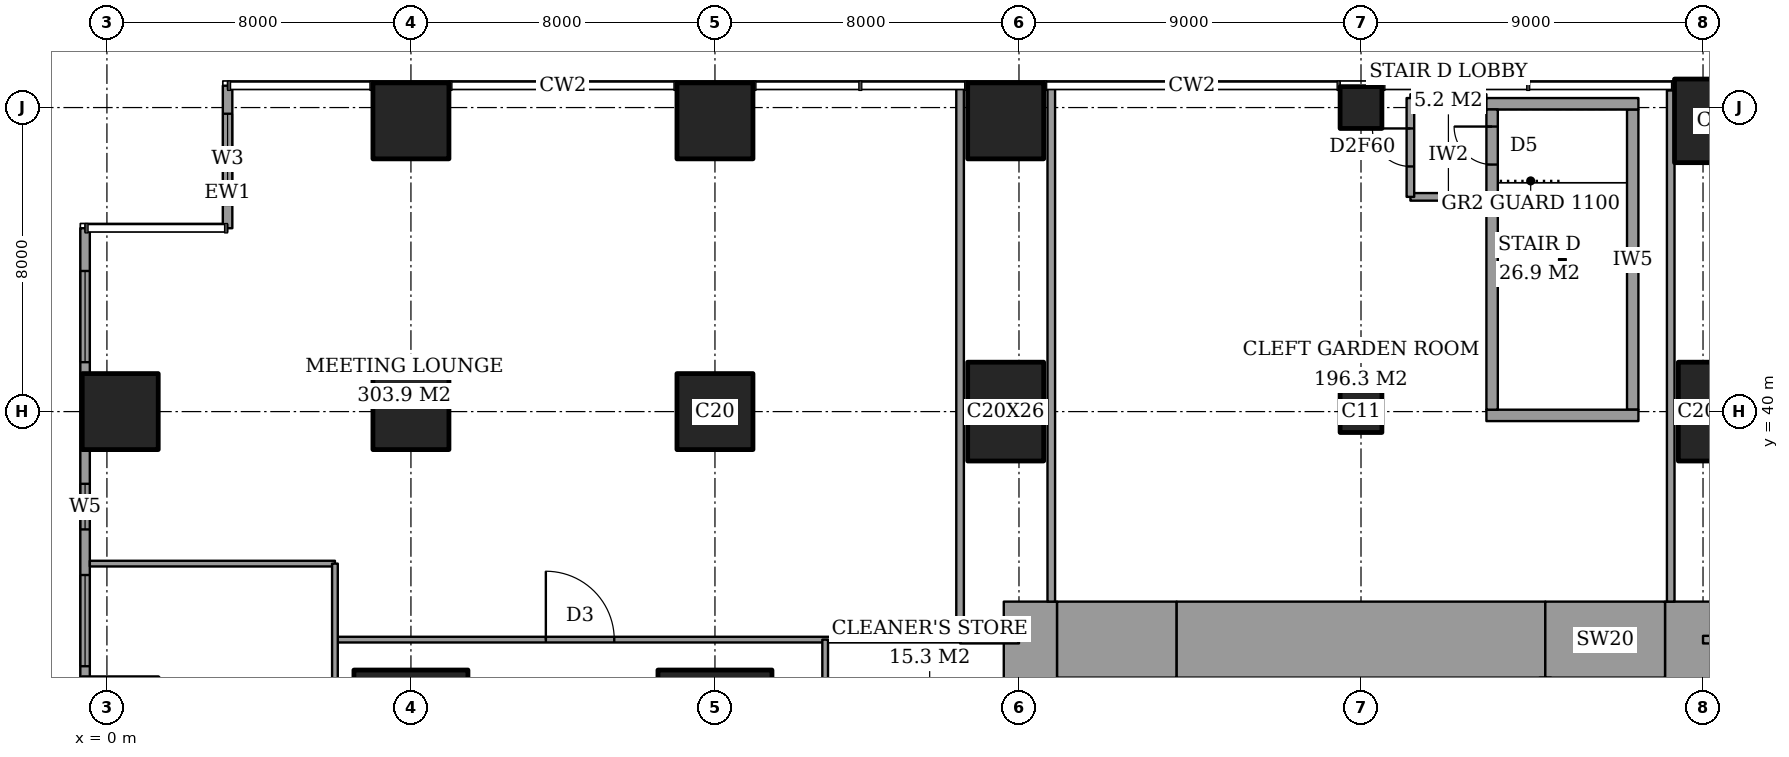
"""IFC4 building model, lengths in metres.
Left out: names, types, materials, properties, quantities, classifications, styles, units other than length and angle.
Written with IfcOpenShell. Run it as: python <this file> out.ifc"""

import sys

from ifc_helpers import new_model, si_unit, direction, frame, frame_2d, origin, origin_2d, place, context, subcontext, project, spatial, rectangle, extrude, element, fill, save


model = new_model("IFC4")
c1 = context("Model", 3, precision=1e-05, world=origin(), true_north=direction((0.0, 1.0)))
c2 = subcontext(c1, "Body", "Model", "MODEL_VIEW")
j1 = project(units=[si_unit("LENGTHUNIT", "METRE"), si_unit("PLANEANGLEUNIT", "RADIAN")], contexts=[c1])
p1 = place(None, origin())
s1 = spatial("IfcSite", under=j1, at=p1, CompositionType="ELEMENT")
p2 = place(p1, origin())
s2 = spatial("IfcBuilding", under=s1, at=p2, CompositionType="ELEMENT")
p3 = place(p2, frame((0.0, 0.0, 21.0)))
s3 = spatial("IfcBuildingStorey", under=s2, at=p3, CompositionType="ELEMENT", Elevation=21.0)
p4 = place(p3, frame((0.35, 40.0, 0.0), z_axis=(0.0, 0.0, 1.0), x_axis=(1.0, 0.0, 0.0)))
e1 = element("IfcColumn", 1, at=p4, inside=s3, PredefinedType="COLUMN", context=c2, shape_type="SweptSolid", body=[
    extrude(rectangle(XDim=2.0, YDim=2.0, at=origin_2d()), origin(), (0.0, 0.0, 1.0), 5.0),
])
p5 = place(p3, frame((8.0, 32.0, 0.0), z_axis=(0.0, 0.0, 1.0), x_axis=(1.0, 0.0, 0.0)))
e2 = element("IfcColumn", 2, at=p5, inside=s3, PredefinedType="COLUMN", context=c2, shape_type="SweptSolid", body=[
    extrude(rectangle(XDim=3.0, YDim=2.4, at=origin_2d()), origin(), (0.0, 0.0, 1.0), 5.0),
])
for number, where, z_axis, x_axis in (
    (3, (8.0, 40.0, 0.0), (0.0, 0.0, 1.0), (1.0, 0.0, 0.0)),
    (4, (8.0, 47.65, 0.0), (0.0, 0.0, 1.0), (1.0, 0.0, 0.0)),
):
    element("IfcColumn", number, at=place(p3, frame(where, z_axis=z_axis, x_axis=x_axis)), inside=s3, PredefinedType="COLUMN", context=c2, shape_type="SweptSolid", body=[
        extrude(rectangle(XDim=2.0, YDim=2.0, at=origin_2d()), origin(), (0.0, 0.0, 1.0), 5.0),
    ])
p6 = place(p3, frame((16.0, 32.0, 0.0), z_axis=(0.0, 0.0, 1.0), x_axis=(1.0, 0.0, 0.0)))
e5 = element("IfcColumn", 5, at=p6, inside=s3, PredefinedType="COLUMN", context=c2, shape_type="SweptSolid", body=[
    extrude(rectangle(XDim=3.0, YDim=2.4, at=origin_2d()), origin(), (0.0, 0.0, 1.0), 5.0),
])
for number, where, z_axis, x_axis in (
    (6, (16.0, 40.0, 0.0), (0.0, 0.0, 1.0), (1.0, 0.0, 0.0)),
    (7, (16.0, 47.65, 0.0), (0.0, 0.0, 1.0), (1.0, 0.0, 0.0)),
):
    element("IfcColumn", number, at=place(p3, frame(where, z_axis=z_axis, x_axis=x_axis)), inside=s3, PredefinedType="COLUMN", context=c2, shape_type="SweptSolid", body=[
        extrude(rectangle(XDim=2.0, YDim=2.0, at=origin_2d()), origin(), (0.0, 0.0, 1.0), 5.0),
    ])
p7 = place(p3, frame((23.65, 40.0, 0.0), z_axis=(0.0, 0.0, 1.0), x_axis=(1.0, 0.0, 0.0)))
e8 = element("IfcColumn", 8, at=p7, inside=s3, PredefinedType="COLUMN", context=c2, shape_type="SweptSolid", body=[
    extrude(rectangle(XDim=2.0, YDim=2.6, at=origin_2d()), origin(), (0.0, 0.0, 1.0), 5.0),
])
p8 = place(p3, frame((23.65, 47.65, 0.0), z_axis=(0.0, 0.0, 1.0), x_axis=(1.0, 0.0, 0.0)))
e9 = element("IfcColumn", 9, at=p8, inside=s3, PredefinedType="COLUMN", context=c2, shape_type="SweptSolid", body=[
    extrude(rectangle(XDim=2.0, YDim=2.0, at=origin_2d()), origin(), (0.0, 0.0, 1.0), 5.0),
])
for number, where, z_axis, x_axis in (
    (10, (33.0, 40.0, 0.0), (0.0, 0.0, 1.0), (1.0, 0.0, 0.0)),
    (11, (33.0, 48.0, 0.0), (0.0, 0.0, 1.0), (1.0, 0.0, 0.0)),
):
    element("IfcColumn", number, at=place(p3, frame(where, z_axis=z_axis, x_axis=x_axis)), inside=s3, PredefinedType="COLUMN", context=c2, shape_type="SweptSolid", body=[
        extrude(rectangle(XDim=1.1, YDim=1.1, at=origin_2d()), origin(), (0.0, 0.0, 1.0), 5.0),
    ])
p9 = place(p3, frame((42.35, 40.0, 0.0), z_axis=(0.0, 0.0, 1.0), x_axis=(1.0, 0.0, 0.0)))
e12 = element("IfcColumn", 12, at=p9, inside=s3, PredefinedType="COLUMN", context=c2, shape_type="SweptSolid", body=[
    extrude(rectangle(XDim=2.0, YDim=2.6, at=origin_2d()), origin(), (0.0, 0.0, 1.0), 5.0),
])
p10 = place(p3, frame((42.35, 47.65, 0.0), z_axis=(0.0, 0.0, 1.0), x_axis=(1.0, 0.0, 0.0)))
e13 = element("IfcColumn", 13, at=p10, inside=s3, PredefinedType="COLUMN", context=c2, shape_type="SweptSolid", body=[
    extrude(rectangle(XDim=2.2, YDim=2.2, at=origin_2d()), origin(), (0.0, 0.0, 1.0), 5.0),
])
p11 = place(p3, frame((25.0, 34.0, 0.0), z_axis=(0.0, 0.0, 1.0), x_axis=(1.0, 0.0, 0.0)))
e14 = element("IfcWall", 14, at=p11, inside=s3, PredefinedType="SHEAR", context=c2, shape_type="SweptSolid", body=[
    extrude(rectangle(XDim=3.15, YDim=2.0, at=frame_2d((1.575, 0.0))), origin(), (0.0, 0.0, 1.0), 5.0),
])
p12 = place(p3, frame((28.15, 34.0, 0.0), z_axis=(0.0, 0.0, 1.0), x_axis=(1.0, 0.0, 0.0)))
e15 = element("IfcWall", 15, at=p12, inside=s3, PredefinedType="SHEAR", context=c2, shape_type="SweptSolid", body=[
    extrude(rectangle(XDim=9.7, YDim=2.0, at=frame_2d((4.85, 0.0))), origin(), (0.0, 0.0, 1.0), 5.0),
])
p13 = place(p3, frame((37.85, 34.0, 0.0), z_axis=(0.0, 0.0, 1.0), x_axis=(1.0, 0.0, 0.0)))
e16 = element("IfcWall", 16, at=p13, inside=s3, PredefinedType="SHEAR", context=c2, shape_type="SweptSolid", body=[
    extrude(rectangle(XDim=3.15, YDim=2.0, at=frame_2d((1.575, 0.0))), origin(), (0.0, 0.0, 1.0), 5.0),
])
p14 = place(p3, frame((24.3, 23.15, 0.0), z_axis=(0.0, 0.0, 1.0), x_axis=(0.0, 1.0, 0.0)))
e17 = element("IfcWall", 17, at=p14, inside=s3, PredefinedType="SHEAR", context=c2, shape_type="SweptSolid", body=[
    extrude(rectangle(XDim=11.85, YDim=1.4, at=frame_2d((5.925, 0.0))), origin(), (0.0, 0.0, 1.0), 5.0),
])
p15 = place(p14, frame((0.75, 0.0, 0.0)))
e18 = element("IfcOpeningElement", 18, at=p15, cuts=e17, PredefinedType="OPENING", context=c2, shape_type="SweptSolid", body=[
    extrude(rectangle(XDim=1.8, YDim=2.4, at=frame_2d((0.9, 1.2))), frame((0.0, 0.71, 0.0), z_axis=(0.0, -1.0, 0.0), x_axis=(1.0, 0.0, 0.0)), (0.0, 0.0, 1.0), 1.42),
])
p16 = place(p3, frame((41.7, 24.85, 0.0), z_axis=(0.0, 0.0, 1.0), x_axis=(0.0, 1.0, 0.0)))
e19 = element("IfcWall", 19, at=p16, inside=s3, PredefinedType="SHEAR", context=c2, shape_type="SweptSolid", body=[
    extrude(rectangle(XDim=10.15, YDim=1.4, at=frame_2d((5.075, 0.0))), origin(), (0.0, 0.0, 1.0), 5.0),
])
p17 = place(p3, frame((3.175, 48.575, 0.0), z_axis=(0.0, 0.0, 1.0), x_axis=(0.0, -1.0, 0.0)))
e20 = element("IfcWall", 20, at=p17, inside=s3, PredefinedType="SOLIDWALL", context=c2, shape_type="SweptSolid", body=[
    extrude(rectangle(XDim=3.75, YDim=0.25, at=frame_2d((1.875, 0.0))), origin(), (0.0, 0.0, 1.0), 5.0),
])
p18 = place(p17, frame((0.738, 0.0, 0.6)))
e21 = element("IfcOpeningElement", 21, at=p18, cuts=e20, PredefinedType="OPENING", context=c2, shape_type="SweptSolid", body=[
    extrude(rectangle(XDim=2.4, YDim=3.0, at=frame_2d((1.2, 1.5))), frame((0.0, 0.135, 0.0), z_axis=(0.0, -1.0, 0.0), x_axis=(1.0, 0.0, 0.0)), (0.0, 0.0, 1.0), 0.27),
])
p19 = place(p3, frame((-0.575, 44.825, 0.0), z_axis=(0.0, 0.0, 1.0), x_axis=(0.0, -1.0, 0.0)))
e22 = element("IfcWall", 22, at=p19, inside=s3, PredefinedType="SOLIDWALL", context=c2, shape_type="SweptSolid", body=[
    extrude(rectangle(XDim=41.65, YDim=0.25, at=frame_2d((20.825, 0.0))), origin(), (0.0, 0.0, 1.0), 5.0),
])
p20 = place(p19, frame((6.725, 0.0, 0.6)))
e23 = element("IfcOpeningElement", 23, at=p20, cuts=e22, PredefinedType="OPENING", context=c2, shape_type="SweptSolid", body=[
    extrude(rectangle(XDim=1.2, YDim=3.0, at=frame_2d((0.6, 1.5))), frame((0.0, 0.135, 0.0), z_axis=(0.0, -1.0, 0.0), x_axis=(1.0, 0.0, 0.0)), (0.0, 0.0, 1.0), 0.27),
])
p21 = place(p19, frame((1.125, 0.0, 0.6)))
e24 = element("IfcOpeningElement", 24, at=p21, cuts=e22, PredefinedType="OPENING", context=c2, shape_type="SweptSolid", body=[
    extrude(rectangle(XDim=2.4, YDim=3.0, at=frame_2d((1.2, 1.5))), frame((0.0, 0.135, 0.0), z_axis=(0.0, -1.0, 0.0), x_axis=(1.0, 0.0, 0.0)), (0.0, 0.0, 1.0), 0.27),
])
p22 = place(p19, frame((9.125, 0.0, 0.6)))
e25 = element("IfcOpeningElement", 25, at=p22, cuts=e22, PredefinedType="OPENING", context=c2, shape_type="SweptSolid", body=[
    extrude(rectangle(XDim=2.4, YDim=3.0, at=frame_2d((1.2, 1.5))), frame((0.0, 0.135, 0.0), z_axis=(0.0, -1.0, 0.0), x_axis=(1.0, 0.0, 0.0)), (0.0, 0.0, 1.0), 0.27),
])
p23 = place(p19, frame((14.125, 0.0, 0.6)))
e26 = element("IfcOpeningElement", 26, at=p23, cuts=e22, PredefinedType="OPENING", context=c2, shape_type="SweptSolid", body=[
    extrude(rectangle(XDim=2.4, YDim=3.0, at=frame_2d((1.2, 1.5))), frame((0.0, 0.135, 0.0), z_axis=(0.0, -1.0, 0.0), x_axis=(1.0, 0.0, 0.0)), (0.0, 0.0, 1.0), 0.27),
])
p24 = place(p19, frame((17.125, 0.0, 0.6)))
e27 = element("IfcOpeningElement", 27, at=p24, cuts=e22, PredefinedType="OPENING", context=c2, shape_type="SweptSolid", body=[
    extrude(rectangle(XDim=2.4, YDim=3.0, at=frame_2d((1.2, 1.5))), frame((0.0, 0.135, 0.0), z_axis=(0.0, -1.0, 0.0), x_axis=(1.0, 0.0, 0.0)), (0.0, 0.0, 1.0), 0.27),
])
p25 = place(p19, frame((22.125, 0.0, 0.6)))
e28 = element("IfcOpeningElement", 28, at=p25, cuts=e22, PredefinedType="OPENING", context=c2, shape_type="SweptSolid", body=[
    extrude(rectangle(XDim=2.4, YDim=3.0, at=frame_2d((1.2, 1.5))), frame((0.0, 0.135, 0.0), z_axis=(0.0, -1.0, 0.0), x_axis=(1.0, 0.0, 0.0)), (0.0, 0.0, 1.0), 0.27),
])
p26 = place(p19, frame((25.125, 0.0, 0.6)))
e29 = element("IfcOpeningElement", 29, at=p26, cuts=e22, PredefinedType="OPENING", context=c2, shape_type="SweptSolid", body=[
    extrude(rectangle(XDim=2.4, YDim=3.0, at=frame_2d((1.2, 1.5))), frame((0.0, 0.135, 0.0), z_axis=(0.0, -1.0, 0.0), x_axis=(1.0, 0.0, 0.0)), (0.0, 0.0, 1.0), 0.27),
])
p27 = place(p19, frame((30.125, 0.0, 0.6)))
e30 = element("IfcOpeningElement", 30, at=p27, cuts=e22, PredefinedType="OPENING", context=c2, shape_type="SweptSolid", body=[
    extrude(rectangle(XDim=2.4, YDim=3.0, at=frame_2d((1.2, 1.5))), frame((0.0, 0.135, 0.0), z_axis=(0.0, -1.0, 0.0), x_axis=(1.0, 0.0, 0.0)), (0.0, 0.0, 1.0), 0.27),
])
p28 = place(p19, frame((33.125, 0.0, 0.6)))
e31 = element("IfcOpeningElement", 31, at=p28, cuts=e22, PredefinedType="OPENING", context=c2, shape_type="SweptSolid", body=[
    extrude(rectangle(XDim=2.4, YDim=3.0, at=frame_2d((1.2, 1.5))), frame((0.0, 0.135, 0.0), z_axis=(0.0, -1.0, 0.0), x_axis=(1.0, 0.0, 0.0)), (0.0, 0.0, 1.0), 0.27),
])
p29 = place(p19, frame((38.125, 0.0, 0.6)))
e32 = element("IfcOpeningElement", 32, at=p29, cuts=e22, PredefinedType="OPENING", context=c2, shape_type="SweptSolid", body=[
    extrude(rectangle(XDim=2.4, YDim=3.0, at=frame_2d((1.2, 1.5))), frame((0.0, 0.135, 0.0), z_axis=(0.0, -1.0, 0.0), x_axis=(1.0, 0.0, 0.0)), (0.0, 0.0, 1.0), 0.27),
])
p30 = place(p3, frame((22.45, 34.0, 0.0), z_axis=(0.0, 0.0, 1.0), x_axis=(1.0, 0.0, 0.0)))
e33 = element("IfcWall", 33, at=p30, inside=s3, PredefinedType="PARTITIONING", context=c2, shape_type="SweptSolid", body=[
    extrude(rectangle(XDim=1.55, YDim=0.2, at=frame_2d((0.775, 0.0))), origin(), (0.0, 0.0, 1.0), 4.65),
])
p31 = place(p3, frame((42.0, 34.0, 0.0), z_axis=(0.0, 0.0, 1.0), x_axis=(1.0, 0.0, 0.0)))
e34 = element("IfcWall", 34, at=p31, inside=s3, PredefinedType="PARTITIONING", context=c2, shape_type="SweptSolid", body=[
    extrude(rectangle(XDim=6.0, YDim=0.2, at=frame_2d((3.0, 0.0))), origin(), (0.0, 0.0, 1.0), 4.65),
])
p32 = place(p3, frame((6.0, 34.0, 0.0), z_axis=(0.0, 0.0, 1.0), x_axis=(1.0, 0.0, 0.0)))
e35 = element("IfcWall", 35, at=p32, inside=s3, PredefinedType="PARTITIONING", context=c2, shape_type="SweptSolid", body=[
    extrude(rectangle(XDim=16.45, YDim=0.15, at=frame_2d((8.225, 0.0))), origin(), (0.0, 0.0, 1.0), 4.65),
])
p33 = place(p32, frame((5.55, 0.0, 0.0)))
e36 = element("IfcOpeningElement", 36, at=p33, cuts=e35, PredefinedType="OPENING", context=c2, shape_type="SweptSolid", body=[
    extrude(rectangle(XDim=1.8, YDim=2.1, at=frame_2d((0.9, 1.05))), frame((0.0, 0.085, 0.0), z_axis=(0.0, -1.0, 0.0), x_axis=(1.0, 0.0, 0.0)), (0.0, 0.0, 1.0), 0.17),
])
p34 = place(p3, frame((-0.45, 36.0, 0.0), z_axis=(0.0, 0.0, 1.0), x_axis=(1.0, 0.0, 0.0)))
e37 = element("IfcWall", 37, at=p34, inside=s3, PredefinedType="PARTITIONING", context=c2, shape_type="SweptSolid", body=[
    extrude(rectangle(XDim=6.45, YDim=0.15, at=frame_2d((3.225, 0.0))), origin(), (0.0, 0.0, 1.0), 4.65),
])
p35 = place(p3, frame((34.3, 45.65, 0.0), z_axis=(0.0, 0.0, 1.0), x_axis=(1.0, 0.0, 0.0)))
e38 = element("IfcWall", 38, at=p35, inside=s3, PredefinedType="PARTITIONING", context=c2, shape_type="SweptSolid", body=[
    extrude(rectangle(XDim=2.0, YDim=0.2, at=frame_2d((1.0, 0.0))), origin(), (0.0, 0.0, 1.0), 4.65),
])
p36 = place(p3, frame((34.3, 48.25, 0.0), z_axis=(0.0, 0.0, 1.0), x_axis=(1.0, 0.0, 0.0)))
e39 = element("IfcWall", 39, at=p36, inside=s3, PredefinedType="PARTITIONING", context=c2, shape_type="SweptSolid", body=[
    extrude(rectangle(XDim=2.0, YDim=0.2, at=frame_2d((1.0, 0.0))), origin(), (0.0, 0.0, 1.0), 2.85),
])
p37 = place(p3, frame((6.0, 28.725, 0.0), z_axis=(0.0, 0.0, 1.0), x_axis=(0.0, 1.0, 0.0)))
e40 = element("IfcWall", 40, at=p37, inside=s3, PredefinedType="PARTITIONING", context=c2, shape_type="SweptSolid", body=[
    extrude(rectangle(XDim=7.275, YDim=0.15, at=frame_2d((3.637, 0.0))), origin(), (0.0, 0.0, 1.0), 4.65),
])
p38 = place(p3, frame((18.9, 31.0, 0.0), z_axis=(0.0, 0.0, 1.0), x_axis=(0.0, 1.0, 0.0)))
e41 = element("IfcWall", 41, at=p38, inside=s3, PredefinedType="PARTITIONING", context=c2, shape_type="SweptSolid", body=[
    extrude(rectangle(XDim=3.0, YDim=0.15, at=frame_2d((1.5, 0.0))), origin(), (0.0, 0.0, 1.0), 4.65),
])
p39 = place(p38, frame((1.05, 0.0, 0.0)))
e42 = element("IfcOpeningElement", 42, at=p39, cuts=e41, PredefinedType="OPENING", context=c2, shape_type="SweptSolid", body=[
    extrude(rectangle(XDim=0.9, YDim=2.1, at=frame_2d((0.45, 1.05))), frame((0.0, 0.085, 0.0), z_axis=(0.0, -1.0, 0.0), x_axis=(1.0, 0.0, 0.0)), (0.0, 0.0, 1.0), 0.17),
])
p40 = place(p3, frame((22.45, 34.0, 0.0), z_axis=(0.0, 0.0, 1.0), x_axis=(0.0, 1.0, 0.0)))
e43 = element("IfcWall", 43, at=p40, inside=s3, PredefinedType="PARTITIONING", context=c2, shape_type="SweptSolid", body=[
    extrude(rectangle(XDim=14.561, YDim=0.2, at=frame_2d((7.281, 0.0))), origin(), (0.0, 0.0, 1.0), 4.65),
])
p41 = place(p3, frame((24.85, 35.0, 0.0), z_axis=(0.0, 0.0, 1.0), x_axis=(0.0, 1.0, 0.0)))
e44 = element("IfcWall", 44, at=p41, inside=s3, PredefinedType="PARTITIONING", context=c2, shape_type="SweptSolid", body=[
    extrude(rectangle(XDim=13.561, YDim=0.2, at=frame_2d((6.781, 0.0))), origin(), (0.0, 0.0, 1.0), 4.65),
])
p42 = place(p3, frame((34.3, 45.65, 0.0), z_axis=(0.0, 0.0, 1.0), x_axis=(0.0, 1.0, 0.0)))
e45 = element("IfcWall", 45, at=p42, inside=s3, PredefinedType="PARTITIONING", context=c2, shape_type="SweptSolid", body=[
    extrude(rectangle(XDim=2.6, YDim=0.2, at=frame_2d((1.3, 0.0))), origin(), (0.0, 0.0, 1.0), 4.65),
])
p43 = place(p42, frame((0.8, 0.0, 0.0)))
e46 = element("IfcOpeningElement", 46, at=p43, cuts=e45, PredefinedType="OPENING", context=c2, shape_type="SweptSolid", body=[
    extrude(rectangle(XDim=1.0, YDim=2.1, at=frame_2d((0.5, 1.05))), frame((0.0, 0.11, 0.0), z_axis=(0.0, -1.0, 0.0), x_axis=(1.0, 0.0, 0.0)), (0.0, 0.0, 1.0), 0.22),
])
p44 = place(p3, frame((41.15, 35.0, 0.0), z_axis=(0.0, 0.0, 1.0), x_axis=(0.0, 1.0, 0.0)))
e47 = element("IfcWall", 47, at=p44, inside=s3, PredefinedType="PARTITIONING", context=c2, shape_type="SweptSolid", body=[
    extrude(rectangle(XDim=13.45, YDim=0.2, at=frame_2d((6.725, 0.0))), origin(), (0.0, 0.0, 1.0), 4.65),
])
for number, where, z_axis, x_axis in (
    (48, (36.3, 39.9, 0.0), (0.0, 0.0, 1.0), (1.0, 0.0, 0.0)),
    (49, (36.3, 48.1, 0.0), (0.0, 0.0, 1.0), (1.0, 0.0, 0.0)),
):
    element("IfcWall", number, at=place(p3, frame(where, z_axis=z_axis, x_axis=x_axis)), inside=s3, PredefinedType="PARTITIONING", context=c2, shape_type="SweptSolid", body=[
        extrude(rectangle(XDim=4.0, YDim=0.3, at=frame_2d((2.0, 0.0))), origin(), (0.0, 0.0, 1.0), 4.65),
    ])
p45 = place(p3, frame((36.45, 40.05, 0.0), z_axis=(0.0, 0.0, 1.0), x_axis=(0.0, 1.0, 0.0)))
e50 = element("IfcWall", 50, at=p45, inside=s3, PredefinedType="PARTITIONING", context=c2, shape_type="SweptSolid", body=[
    extrude(rectangle(XDim=7.9, YDim=0.3, at=frame_2d((3.95, 0.0))), origin(), (0.0, 0.0, 1.0), 4.65),
])
p46 = place(p45, frame((6.45, 0.0, 0.0)))
e51 = element("IfcOpeningElement", 51, at=p46, cuts=e50, PredefinedType="OPENING", context=c2, shape_type="SweptSolid", body=[
    extrude(rectangle(XDim=1.0, YDim=2.1, at=frame_2d((0.5, 1.05))), frame((0.0, 0.16, 0.0), z_axis=(0.0, -1.0, 0.0), x_axis=(1.0, 0.0, 0.0)), (0.0, 0.0, 1.0), 0.32),
])
p47 = place(p3, frame((40.15, 40.05, 0.0), z_axis=(0.0, 0.0, 1.0), x_axis=(0.0, 1.0, 0.0)))
e52 = element("IfcWall", 52, at=p47, inside=s3, PredefinedType="PARTITIONING", context=c2, shape_type="SweptSolid", body=[
    extrude(rectangle(XDim=7.9, YDim=0.3, at=frame_2d((3.95, 0.0))), origin(), (0.0, 0.0, 1.0), 4.65),
])
p48 = place(p18, origin())
e53 = element("IfcWindow", 53, at=p48, inside=s3, PartitioningType="SINGLE_PANEL", PredefinedType="WINDOW", context=c2, shape_type="SweptSolid", body=[
    extrude(rectangle(XDim=2.4, YDim=3.0, at=frame_2d((1.2, 1.5))), frame((0.0, 0.03, 0.0), z_axis=(0.0, -1.0, 0.0), x_axis=(1.0, 0.0, 0.0)), (0.0, 0.0, 1.0), 0.06),
])
fill(e21, e53)
p49 = place(p20, origin())
e54 = element("IfcWindow", 54, at=p49, inside=s3, PartitioningType="SINGLE_PANEL", PredefinedType="WINDOW", context=c2, shape_type="SweptSolid", body=[
    extrude(rectangle(XDim=1.2, YDim=3.0, at=frame_2d((0.6, 1.5))), frame((0.0, 0.03, 0.0), z_axis=(0.0, -1.0, 0.0), x_axis=(1.0, 0.0, 0.0)), (0.0, 0.0, 1.0), 0.06),
])
fill(e23, e54)
p50 = place(p21, origin())
e55 = element("IfcWindow", 55, at=p50, inside=s3, PartitioningType="SINGLE_PANEL", PredefinedType="WINDOW", context=c2, shape_type="SweptSolid", body=[
    extrude(rectangle(XDim=2.4, YDim=3.0, at=frame_2d((1.2, 1.5))), frame((0.0, 0.03, 0.0), z_axis=(0.0, -1.0, 0.0), x_axis=(1.0, 0.0, 0.0)), (0.0, 0.0, 1.0), 0.06),
])
fill(e24, e55)
p51 = place(p22, origin())
e56 = element("IfcWindow", 56, at=p51, inside=s3, PartitioningType="SINGLE_PANEL", PredefinedType="WINDOW", context=c2, shape_type="SweptSolid", body=[
    extrude(rectangle(XDim=2.4, YDim=3.0, at=frame_2d((1.2, 1.5))), frame((0.0, 0.03, 0.0), z_axis=(0.0, -1.0, 0.0), x_axis=(1.0, 0.0, 0.0)), (0.0, 0.0, 1.0), 0.06),
])
fill(e25, e56)
p52 = place(p33, origin())
e57 = element("IfcDoor", 57, at=p52, inside=s3, OperationType="DOUBLE_DOOR_DOUBLE_SWING", PredefinedType="DOOR", context=c2, shape_type="SweptSolid", body=[
    extrude(rectangle(XDim=1.8, YDim=2.1, at=frame_2d((0.9, 1.05))), frame((0.0, 0.025, 0.0), z_axis=(0.0, -1.0, 0.0), x_axis=(1.0, 0.0, 0.0)), (0.0, 0.0, 1.0), 0.05),
])
fill(e36, e57)
p53 = place(p43, origin())
e58 = element("IfcDoor", 58, at=p53, inside=s3, OperationType="SINGLE_SWING_LEFT", PredefinedType="DOOR", context=c2, shape_type="SweptSolid", body=[
    extrude(rectangle(XDim=1.0, YDim=2.1, at=frame_2d((0.5, 1.05))), frame((0.0, 0.025, 0.0), z_axis=(0.0, -1.0, 0.0), x_axis=(1.0, 0.0, 0.0)), (0.0, 0.0, 1.0), 0.05),
])
fill(e46, e58)
p54 = place(p46, origin())
e59 = element("IfcDoor", 59, at=p54, inside=s3, OperationType="SINGLE_SWING_LEFT", PredefinedType="DOOR", context=c2, shape_type="SweptSolid", body=[
    extrude(rectangle(XDim=1.0, YDim=2.1, at=frame_2d((0.5, 1.05))), frame((0.0, 0.025, 0.0), z_axis=(0.0, -1.0, 0.0), x_axis=(1.0, 0.0, 0.0)), (0.0, 0.0, 1.0), 0.05),
])
fill(e51, e59)
save(model, sys.argv[1])
